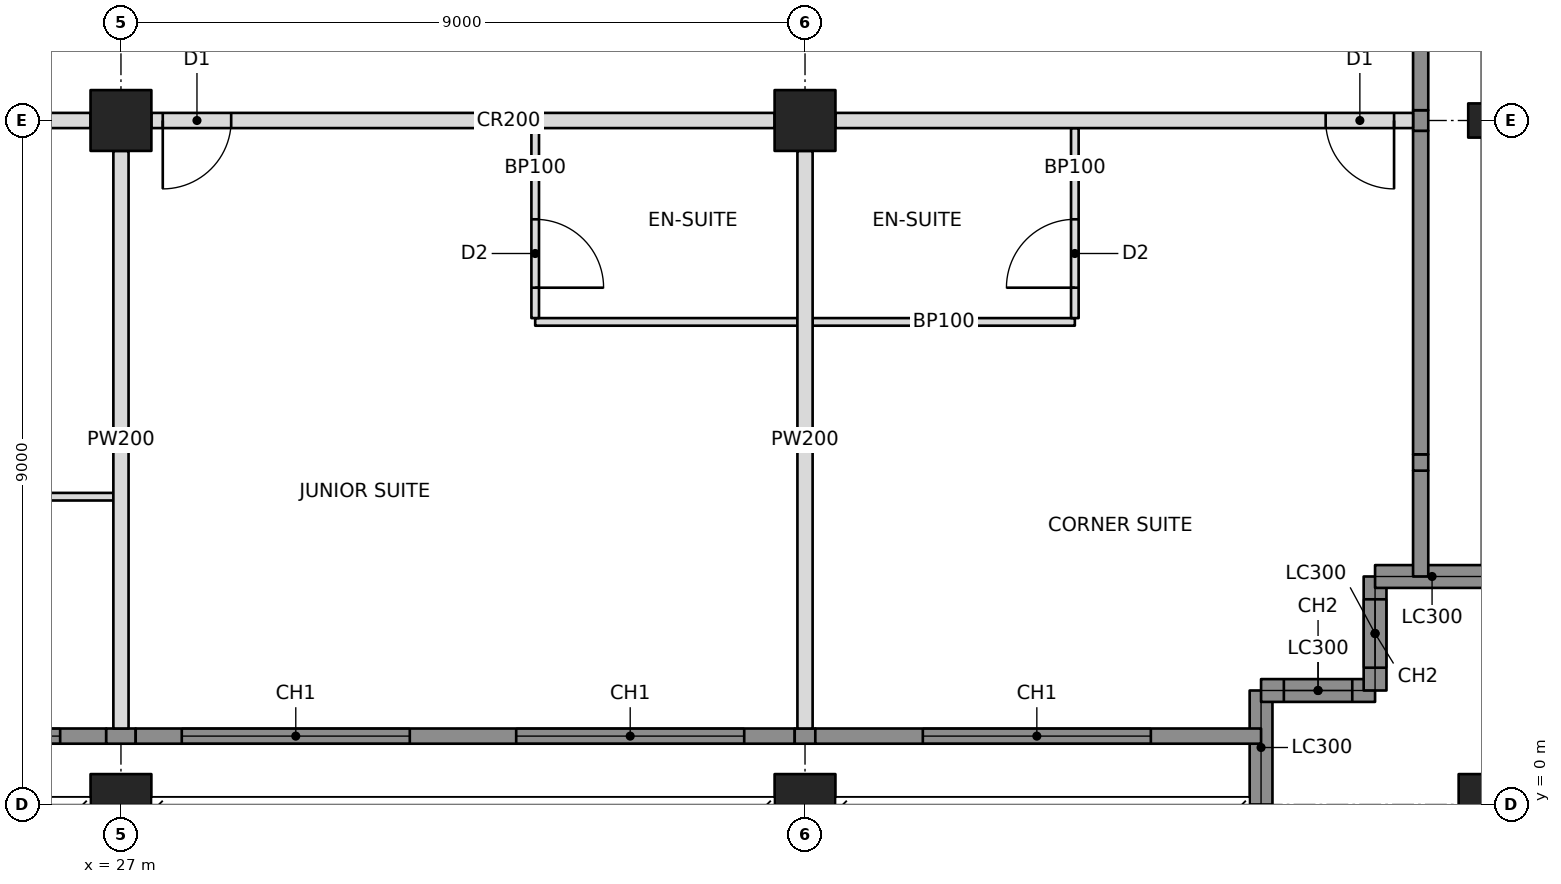
"""IFC4 building model, lengths in metres.
Left out: names, types, materials, properties, quantities, classifications, styles, units other than length and angle.
Written with IfcOpenShell. Run it as: python <this file> out.ifc"""

import sys

from ifc_helpers import new_model, si_unit, direction, frame, frame_2d, origin, origin_2d, place, context, subcontext, project, spatial, rectangle, hollow_rectangle, i_section, extrude, element, fill, save


model = new_model("IFC4")
c1 = context("Model", 3, precision=1e-05, world=origin(), true_north=direction((0.0, 1.0)))
c2 = subcontext(c1, "Body", "Model", "MODEL_VIEW")
j1 = project(units=[si_unit("LENGTHUNIT", "METRE"), si_unit("PLANEANGLEUNIT", "RADIAN")], contexts=[c1])
p1 = place(None, origin())
s1 = spatial("IfcSite", under=j1, at=p1, CompositionType="ELEMENT")
p2 = place(p1, origin())
s2 = spatial("IfcBuilding", under=s1, at=p2, CompositionType="ELEMENT")
p3 = place(p2, frame((0.0, 0.0, 174.0)))
s3 = spatial("IfcBuildingStorey", under=s2, at=p3, CompositionType="ELEMENT", Elevation=174.0)
p4 = place(p3, frame((27.0, 0.0, 0.0), z_axis=(0.0, 0.0, 1.0), x_axis=(1.0, 0.0, 0.0)))
e1 = element("IfcColumn", 1, at=p4, inside=s3, PredefinedType="COLUMN", context=c2, shape_type="SweptSolid", body=[
    extrude(hollow_rectangle(XDim=0.8, YDim=0.8, WallThickness=0.07, at=origin_2d()), origin(), (0.0, 0.0, 1.0), 3.4),
])
p5 = place(p3, frame((27.0, 9.0, 0.0), z_axis=(0.0, 0.0, 1.0), x_axis=(1.0, 0.0, 0.0)))
e2 = element("IfcColumn", 2, at=p5, inside=s3, PredefinedType="COLUMN", context=c2, shape_type="SweptSolid", body=[
    extrude(hollow_rectangle(XDim=0.8, YDim=0.8, WallThickness=0.06, at=origin_2d()), origin(), (0.0, 0.0, 1.0), 3.4),
])
p6 = place(p3, frame((36.0, 0.0, 0.0), z_axis=(0.0, 0.0, 1.0), x_axis=(1.0, 0.0, 0.0)))
e3 = element("IfcColumn", 3, at=p6, inside=s3, PredefinedType="COLUMN", context=c2, shape_type="SweptSolid", body=[
    extrude(hollow_rectangle(XDim=0.8, YDim=0.8, WallThickness=0.07, at=origin_2d()), origin(), (0.0, 0.0, 1.0), 3.4),
])
p7 = place(p3, frame((36.0, 9.0, 0.0), z_axis=(0.0, 0.0, 1.0), x_axis=(0.0, 1.0, 0.0)))
e4 = element("IfcColumn", 4, at=p7, inside=s3, PredefinedType="COLUMN", context=c2, shape_type="SweptSolid", body=[
    extrude(hollow_rectangle(XDim=0.8, YDim=0.8, WallThickness=0.06, at=origin_2d()), origin(), (0.0, 0.0, 1.0), 3.4),
])
p8 = place(p3, frame((45.0, 0.0, 0.0), z_axis=(0.0, 0.0, 1.0), x_axis=(1.0, 0.0, 0.0)))
e5 = element("IfcColumn", 5, at=p8, inside=s3, PredefinedType="COLUMN", context=c2, shape_type="SweptSolid", body=[
    extrude(hollow_rectangle(XDim=0.8, YDim=0.8, WallThickness=0.07, at=origin_2d()), origin(), (0.0, 0.0, 1.0), 3.4),
])
p9 = place(p3, frame((45.0, 9.0, 0.0), z_axis=(0.0, 0.0, 1.0), x_axis=(0.0, 1.0, 0.0)))
e6 = element("IfcColumn", 6, at=p9, inside=s3, PredefinedType="COLUMN", context=c2, shape_type="SweptSolid", body=[
    extrude(i_section(OverallWidth=0.449, OverallDepth=0.549, WebThickness=0.072, FlangeThickness=0.115, at=origin_2d()), origin(), (0.0, 0.0, 1.0), 3.4),
])
p10 = place(p3, frame((42.0, 0.0, 0.0), z_axis=(0.0, 0.0, 1.0), x_axis=(0.0, 1.0, 0.0)))
e7 = element("IfcWall", 7, at=p10, inside=s3, PredefinedType="SOLIDWALL", context=c2, shape_type="SweptSolid", body=[
    extrude(rectangle(XDim=1.5, YDim=0.3, at=frame_2d((0.75, 0.0))), origin(), (0.0, 0.0, 1.0), 2.42),
])
p11 = place(p3, frame((42.0, 1.5, 0.0), z_axis=(0.0, 0.0, 1.0), x_axis=(1.0, 0.0, 0.0)))
e8 = element("IfcWall", 8, at=p11, inside=s3, PredefinedType="SOLIDWALL", context=c2, shape_type="SweptSolid", body=[
    extrude(rectangle(XDim=1.5, YDim=0.3, at=frame_2d((0.75, 0.0))), origin(), (0.0, 0.0, 1.0), 3.2),
])
p12 = place(p11, frame((0.3, 0.0, 0.6)))
e9 = element("IfcOpeningElement", 9, at=p12, cuts=e8, PredefinedType="OPENING", context=c2, shape_type="SweptSolid", body=[
    extrude(rectangle(XDim=0.9, YDim=2.2, at=frame_2d((0.45, 1.1))), frame((0.0, 0.16, 0.0), z_axis=(0.0, -1.0, 0.0), x_axis=(1.0, 0.0, 0.0)), (0.0, 0.0, 1.0), 0.32),
])
p13 = place(p3, frame((43.5, 1.5, 0.0), z_axis=(0.0, 0.0, 1.0), x_axis=(0.0, 1.0, 0.0)))
e10 = element("IfcWall", 10, at=p13, inside=s3, PredefinedType="SOLIDWALL", context=c2, shape_type="SweptSolid", body=[
    extrude(rectangle(XDim=1.5, YDim=0.3, at=frame_2d((0.75, 0.0))), origin(), (0.0, 0.0, 1.0), 3.2),
])
p14 = place(p13, frame((0.3, 0.0, 0.6)))
e11 = element("IfcOpeningElement", 11, at=p14, cuts=e10, PredefinedType="OPENING", context=c2, shape_type="SweptSolid", body=[
    extrude(rectangle(XDim=0.9, YDim=2.2, at=frame_2d((0.45, 1.1))), frame((0.0, 0.16, 0.0), z_axis=(0.0, -1.0, 0.0), x_axis=(1.0, 0.0, 0.0)), (0.0, 0.0, 1.0), 0.32),
])
p15 = place(p3, frame((43.5, 3.0, 0.0), z_axis=(0.0, 0.0, 1.0), x_axis=(1.0, 0.0, 0.0)))
e12 = element("IfcWall", 12, at=p15, inside=s3, PredefinedType="SOLIDWALL", context=c2, shape_type="SweptSolid", body=[
    extrude(rectangle(XDim=1.5, YDim=0.3, at=frame_2d((0.75, 0.0))), origin(), (0.0, 0.0, 1.0), 2.42),
])
p16 = place(p3, frame((44.1, 3.0, 0.0), z_axis=(0.0, 0.0, 1.0), x_axis=(0.0, 1.0, 0.0)))
e13 = element("IfcWall", 13, at=p16, inside=s3, PredefinedType="SOLIDWALL", context=c2, shape_type="SweptSolid", body=[
    extrude(rectangle(XDim=1.393, YDim=0.2, at=frame_2d((0.696, 0.0))), origin(), (0.0, 0.0, 1.0), 3.2),
])
p17 = place(p3, frame((18.4, 9.0, 0.0), z_axis=(0.0, 0.0, 1.0), x_axis=(1.0, 0.0, 0.0)))
e14 = element("IfcWall", 14, at=p17, inside=s3, PredefinedType="PARTITIONING", context=c2, shape_type="SweptSolid", body=[
    extrude(rectangle(XDim=8.2, YDim=0.2, at=frame_2d((4.1, 0.0))), origin(), (0.0, 0.0, 1.0), 2.405),
])
p18 = place(p17, frame((0.15, 0.0, 0.0)))
e15 = element("IfcOpeningElement", 15, at=p18, cuts=e14, PredefinedType="OPENING", context=c2, shape_type="SweptSolid", body=[
    extrude(rectangle(XDim=0.9, YDim=2.1, at=frame_2d((0.45, 1.05))), frame((0.0, 0.11, 0.0), z_axis=(0.0, -1.0, 0.0), x_axis=(1.0, 0.0, 0.0)), (0.0, 0.0, 1.0), 0.22),
])
p19 = place(p3, frame((27.4, 9.0, 0.0), z_axis=(0.0, 0.0, 1.0), x_axis=(1.0, 0.0, 0.0)))
e16 = element("IfcWall", 16, at=p19, inside=s3, PredefinedType="PARTITIONING", context=c2, shape_type="SweptSolid", body=[
    extrude(rectangle(XDim=8.2, YDim=0.2, at=frame_2d((4.1, 0.0))), origin(), (0.0, 0.0, 1.0), 2.405),
])
p20 = place(p19, frame((0.15, 0.0, 0.0)))
e17 = element("IfcOpeningElement", 17, at=p20, cuts=e16, PredefinedType="OPENING", context=c2, shape_type="SweptSolid", body=[
    extrude(rectangle(XDim=0.9, YDim=2.1, at=frame_2d((0.45, 1.05))), frame((0.0, 0.11, 0.0), z_axis=(0.0, -1.0, 0.0), x_axis=(1.0, 0.0, 0.0)), (0.0, 0.0, 1.0), 0.22),
])
p21 = place(p3, frame((36.4, 9.0, 0.0), z_axis=(0.0, 0.0, 1.0), x_axis=(1.0, 0.0, 0.0)))
e18 = element("IfcWall", 18, at=p21, inside=s3, PredefinedType="PARTITIONING", context=c2, shape_type="SweptSolid", body=[
    extrude(rectangle(XDim=7.6, YDim=0.2, at=frame_2d((3.8, 0.0))), origin(), (0.0, 0.0, 1.0), 2.438),
])
p22 = place(p21, frame((6.45, 0.0, 0.0)))
e19 = element("IfcOpeningElement", 19, at=p22, cuts=e18, PredefinedType="OPENING", context=c2, shape_type="SweptSolid", body=[
    extrude(rectangle(XDim=0.9, YDim=2.1, at=frame_2d((0.45, 1.05))), frame((0.0, 0.11, 0.0), z_axis=(0.0, -1.0, 0.0), x_axis=(1.0, 0.0, 0.0)), (0.0, 0.0, 1.0), 0.22),
])
p23 = place(p3, frame((27.0, 8.6, 0.0), z_axis=(0.0, 0.0, 1.0), x_axis=(0.0, -1.0, 0.0)))
e20 = element("IfcWall", 20, at=p23, inside=s3, PredefinedType="PARTITIONING", context=c2, shape_type="SweptSolid", body=[
    extrude(rectangle(XDim=7.6, YDim=0.2, at=frame_2d((3.8, 0.0))), origin(), (0.0, 0.0, 1.0), 2.405),
])
p24 = place(p3, frame((36.0, 8.6, 0.0), z_axis=(0.0, 0.0, 1.0), x_axis=(0.0, -1.0, 0.0)))
e21 = element("IfcWall", 21, at=p24, inside=s3, PredefinedType="PARTITIONING", context=c2, shape_type="SweptSolid", body=[
    extrude(rectangle(XDim=7.6, YDim=0.2, at=frame_2d((3.8, 0.0))), origin(), (0.0, 0.0, 1.0), 2.438),
])
p25 = place(p3, frame((22.5, 4.05, 0.0), z_axis=(0.0, 0.0, 1.0), x_axis=(1.0, 0.0, 0.0)))
e22 = element("IfcWall", 22, at=p25, inside=s3, PredefinedType="PARTITIONING", context=c2, shape_type="SweptSolid", body=[
    extrude(rectangle(XDim=4.4, YDim=0.1, at=frame_2d((2.2, 0.0))), origin(), (0.0, 0.0, 1.0), 2.404),
])
p26 = place(p25, frame((0.5, 0.0, 0.0)))
e23 = element("IfcOpeningElement", 23, at=p26, cuts=e22, PredefinedType="OPENING", context=c2, shape_type="SweptSolid", body=[
    extrude(rectangle(XDim=0.9, YDim=2.1, at=frame_2d((0.45, 1.05))), frame((0.0, 0.06, 0.0), z_axis=(0.0, -1.0, 0.0), x_axis=(1.0, 0.0, 0.0)), (0.0, 0.0, 1.0), 0.12),
])
p27 = place(p3, frame((32.45, 6.35, 0.0), z_axis=(0.0, 0.0, 1.0), x_axis=(1.0, 0.0, 0.0)))
e24 = element("IfcWall", 24, at=p27, inside=s3, PredefinedType="PARTITIONING", context=c2, shape_type="SweptSolid", body=[
    extrude(rectangle(XDim=3.45, YDim=0.1, at=frame_2d((1.725, 0.0))), origin(), (0.0, 0.0, 1.0), 2.438),
])
p28 = place(p3, frame((32.45, 8.9, 0.0), z_axis=(0.0, 0.0, 1.0), x_axis=(0.0, -1.0, 0.0)))
e25 = element("IfcWall", 25, at=p28, inside=s3, PredefinedType="PARTITIONING", context=c2, shape_type="SweptSolid", body=[
    extrude(rectangle(XDim=2.5, YDim=0.1, at=frame_2d((1.25, 0.0))), origin(), (0.0, 0.0, 1.0), 2.404),
])
p29 = place(p28, frame((1.2, 0.0, 0.0)))
e26 = element("IfcOpeningElement", 26, at=p29, cuts=e25, PredefinedType="OPENING", context=c2, shape_type="SweptSolid", body=[
    extrude(rectangle(XDim=0.9, YDim=2.1, at=frame_2d((0.45, 1.05))), frame((0.0, 0.06, 0.0), z_axis=(0.0, -1.0, 0.0), x_axis=(1.0, 0.0, 0.0)), (0.0, 0.0, 1.0), 0.12),
])
p30 = place(p3, frame((36.1, 6.35, 0.0), z_axis=(0.0, 0.0, 1.0), x_axis=(1.0, 0.0, 0.0)))
e27 = element("IfcWall", 27, at=p30, inside=s3, PredefinedType="PARTITIONING", context=c2, shape_type="SweptSolid", body=[
    extrude(rectangle(XDim=3.45, YDim=0.1, at=frame_2d((1.725, 0.0))), origin(), (0.0, 0.0, 1.0), 2.438),
])
p31 = place(p3, frame((39.55, 8.9, 0.0), z_axis=(0.0, 0.0, 1.0), x_axis=(0.0, -1.0, 0.0)))
e28 = element("IfcWall", 28, at=p31, inside=s3, PredefinedType="PARTITIONING", context=c2, shape_type="SweptSolid", body=[
    extrude(rectangle(XDim=2.5, YDim=0.1, at=frame_2d((1.25, 0.0))), origin(), (0.0, 0.0, 1.0), 2.438),
])
p32 = place(p31, frame((1.2, 0.0, 0.0)))
e29 = element("IfcOpeningElement", 29, at=p32, cuts=e28, PredefinedType="OPENING", context=c2, shape_type="SweptSolid", body=[
    extrude(rectangle(XDim=0.9, YDim=2.1, at=frame_2d((0.45, 1.05))), frame((0.0, 0.06, 0.0), z_axis=(0.0, -1.0, 0.0), x_axis=(1.0, 0.0, 0.0)), (0.0, 0.0, 1.0), 0.12),
])
p33 = place(p3, frame((18.194, 0.9, 0.0), z_axis=(0.0, 0.0, 1.0), x_axis=(1.0, 0.0, 0.0)))
e30 = element("IfcWall", 30, at=p33, inside=s3, PredefinedType="SOLIDWALL", context=c2, shape_type="SweptSolid", body=[
    extrude(rectangle(XDim=8.612, YDim=0.2, at=frame_2d((4.306, 0.0))), origin(), (0.0, 0.0, 1.0), 3.2),
])
p34 = place(p33, frame((0.606, 0.0, 0.6)))
e31 = element("IfcOpeningElement", 31, at=p34, cuts=e30, PredefinedType="OPENING", context=c2, shape_type="SweptSolid", body=[
    extrude(rectangle(XDim=3.0, YDim=2.2, at=frame_2d((1.5, 1.1))), frame((0.0, 0.11, 0.0), z_axis=(0.0, -1.0, 0.0), x_axis=(1.0, 0.0, 0.0)), (0.0, 0.0, 1.0), 0.22),
])
p35 = place(p33, frame((5.006, 0.0, 0.6)))
e32 = element("IfcOpeningElement", 32, at=p35, cuts=e30, PredefinedType="OPENING", context=c2, shape_type="SweptSolid", body=[
    extrude(rectangle(XDim=3.0, YDim=2.2, at=frame_2d((1.5, 1.1))), frame((0.0, 0.11, 0.0), z_axis=(0.0, -1.0, 0.0), x_axis=(1.0, 0.0, 0.0)), (0.0, 0.0, 1.0), 0.22),
])
p36 = place(p3, frame((26.806, 0.9, 0.0), z_axis=(0.0, 0.0, 1.0), x_axis=(1.0, 0.0, 0.0)))
e33 = element("IfcWall", 33, at=p36, inside=s3, PredefinedType="SOLIDWALL", context=c2, shape_type="SweptSolid", body=[
    extrude(rectangle(XDim=0.388, YDim=0.2, at=frame_2d((0.194, 0.0))), origin(), (0.0, 0.0, 1.0), 2.404),
])
p37 = place(p3, frame((27.194, 0.9, 0.0), z_axis=(0.0, 0.0, 1.0), x_axis=(1.0, 0.0, 0.0)))
e34 = element("IfcWall", 34, at=p37, inside=s3, PredefinedType="SOLIDWALL", context=c2, shape_type="SweptSolid", body=[
    extrude(rectangle(XDim=8.671, YDim=0.2, at=frame_2d((4.335, 0.0))), origin(), (0.0, 0.0, 1.0), 3.2),
])
p38 = place(p37, frame((0.606, 0.0, 0.6)))
e35 = element("IfcOpeningElement", 35, at=p38, cuts=e34, PredefinedType="OPENING", context=c2, shape_type="SweptSolid", body=[
    extrude(rectangle(XDim=3.0, YDim=2.2, at=frame_2d((1.5, 1.1))), frame((0.0, 0.11, 0.0), z_axis=(0.0, -1.0, 0.0), x_axis=(1.0, 0.0, 0.0)), (0.0, 0.0, 1.0), 0.22),
])
p39 = place(p37, frame((5.006, 0.0, 0.6)))
e36 = element("IfcOpeningElement", 36, at=p39, cuts=e34, PredefinedType="OPENING", context=c2, shape_type="SweptSolid", body=[
    extrude(rectangle(XDim=3.0, YDim=2.2, at=frame_2d((1.5, 1.1))), frame((0.0, 0.11, 0.0), z_axis=(0.0, -1.0, 0.0), x_axis=(1.0, 0.0, 0.0)), (0.0, 0.0, 1.0), 0.22),
])
p40 = place(p3, frame((35.865, 0.9, 0.0), z_axis=(0.0, 0.0, 1.0), x_axis=(1.0, 0.0, 0.0)))
e37 = element("IfcWall", 37, at=p40, inside=s3, PredefinedType="SOLIDWALL", context=c2, shape_type="SweptSolid", body=[
    extrude(rectangle(XDim=0.271, YDim=0.2, at=frame_2d((0.135, 0.0))), origin(), (0.0, 0.0, 1.0), 2.438),
])
p41 = place(p3, frame((36.135, 0.9, 0.0), z_axis=(0.0, 0.0, 1.0), x_axis=(1.0, 0.0, 0.0)))
e38 = element("IfcWall", 38, at=p41, inside=s3, PredefinedType="SOLIDWALL", context=c2, shape_type="SweptSolid", body=[
    extrude(rectangle(XDim=5.865, YDim=0.2, at=frame_2d((2.932, 0.0))), origin(), (0.0, 0.0, 1.0), 3.2),
])
p42 = place(p41, frame((1.415, 0.0, 0.6)))
e39 = element("IfcOpeningElement", 39, at=p42, cuts=e38, PredefinedType="OPENING", context=c2, shape_type="SweptSolid", body=[
    extrude(rectangle(XDim=3.0, YDim=2.2, at=frame_2d((1.5, 1.1))), frame((0.0, 0.11, 0.0), z_axis=(0.0, -1.0, 0.0), x_axis=(1.0, 0.0, 0.0)), (0.0, 0.0, 1.0), 0.22),
])
p43 = place(p3, frame((44.1, 4.393, 0.0), z_axis=(0.0, 0.0, 1.0), x_axis=(0.0, 1.0, 0.0)))
e40 = element("IfcWall", 40, at=p43, inside=s3, PredefinedType="SOLIDWALL", context=c2, shape_type="SweptSolid", body=[
    extrude(rectangle(XDim=0.215, YDim=0.2, at=frame_2d((0.107, 0.0))), origin(), (0.0, 0.0, 1.0), 2.661),
])
p44 = place(p3, frame((44.1, 4.607, 0.0), z_axis=(0.0, 0.0, 1.0), x_axis=(0.0, 1.0, 0.0)))
e41 = element("IfcWall", 41, at=p44, inside=s3, PredefinedType="SOLIDWALL", context=c2, shape_type="SweptSolid", body=[
    extrude(rectangle(XDim=4.257, YDim=0.2, at=frame_2d((2.129, 0.0))), origin(), (0.0, 0.0, 1.0), 3.2),
])
p45 = place(p3, frame((44.1, 8.865, 0.0), z_axis=(0.0, 0.0, 1.0), x_axis=(0.0, 1.0, 0.0)))
e42 = element("IfcWall", 42, at=p45, inside=s3, PredefinedType="SOLIDWALL", context=c2, shape_type="SweptSolid", body=[
    extrude(rectangle(XDim=0.271, YDim=0.2, at=frame_2d((0.135, 0.0))), origin(), (0.0, 0.0, 1.0), 2.438),
])
p46 = place(p3, frame((44.1, 9.135, 0.0), z_axis=(0.0, 0.0, 1.0), x_axis=(0.0, 1.0, 0.0)))
e43 = element("IfcWall", 43, at=p46, inside=s3, PredefinedType="SOLIDWALL", context=c2, shape_type="SweptSolid", body=[
    extrude(rectangle(XDim=8.671, YDim=0.2, at=frame_2d((4.335, 0.0))), origin(), (0.0, 0.0, 1.0), 3.2),
])
p47 = place(p46, frame((2.015, 0.0, 0.6)))
e44 = element("IfcOpeningElement", 44, at=p47, cuts=e43, PredefinedType="OPENING", context=c2, shape_type="SweptSolid", body=[
    extrude(rectangle(XDim=3.0, YDim=2.2, at=frame_2d((1.5, 1.1))), frame((0.0, 0.11, 0.0), z_axis=(0.0, -1.0, 0.0), x_axis=(1.0, 0.0, 0.0)), (0.0, 0.0, 1.0), 0.22),
])
p48 = place(p46, frame((5.515, 0.0, 0.6)))
e45 = element("IfcOpeningElement", 45, at=p48, cuts=e43, PredefinedType="OPENING", context=c2, shape_type="SweptSolid", body=[
    extrude(rectangle(XDim=3.0, YDim=2.2, at=frame_2d((1.5, 1.1))), frame((0.0, 0.11, 0.0), z_axis=(0.0, -1.0, 0.0), x_axis=(1.0, 0.0, 0.0)), (0.0, 0.0, 1.0), 0.22),
])
p49 = place(p12, origin())
e46 = element("IfcWindow", 46, at=p49, inside=s3, PartitioningType="SINGLE_PANEL", PredefinedType="WINDOW", context=c2, shape_type="SweptSolid", body=[
    extrude(rectangle(XDim=0.9, YDim=2.2, at=frame_2d((0.45, 1.1))), frame((0.0, 0.03, 0.0), z_axis=(0.0, -1.0, 0.0), x_axis=(1.0, 0.0, 0.0)), (0.0, 0.0, 1.0), 0.06),
])
fill(e9, e46)
p50 = place(p14, origin())
e47 = element("IfcWindow", 47, at=p50, inside=s3, PartitioningType="SINGLE_PANEL", PredefinedType="WINDOW", context=c2, shape_type="SweptSolid", body=[
    extrude(rectangle(XDim=0.9, YDim=2.2, at=frame_2d((0.45, 1.1))), frame((0.0, 0.03, 0.0), z_axis=(0.0, -1.0, 0.0), x_axis=(1.0, 0.0, 0.0)), (0.0, 0.0, 1.0), 0.06),
])
fill(e11, e47)
p51 = place(p35, origin())
e48 = element("IfcWindow", 48, at=p51, inside=s3, PartitioningType="TRIPLE_PANEL_VERTICAL", PredefinedType="WINDOW", context=c2, shape_type="SweptSolid", body=[
    extrude(rectangle(XDim=3.0, YDim=2.2, at=frame_2d((1.5, 1.1))), frame((0.0, 0.03, 0.0), z_axis=(0.0, -1.0, 0.0), x_axis=(1.0, 0.0, 0.0)), (0.0, 0.0, 1.0), 0.06),
])
fill(e32, e48)
p52 = place(p38, origin())
e49 = element("IfcWindow", 49, at=p52, inside=s3, PartitioningType="TRIPLE_PANEL_VERTICAL", PredefinedType="WINDOW", context=c2, shape_type="SweptSolid", body=[
    extrude(rectangle(XDim=3.0, YDim=2.2, at=frame_2d((1.5, 1.1))), frame((0.0, 0.03, 0.0), z_axis=(0.0, -1.0, 0.0), x_axis=(1.0, 0.0, 0.0)), (0.0, 0.0, 1.0), 0.06),
])
fill(e35, e49)
p53 = place(p39, origin())
e50 = element("IfcWindow", 50, at=p53, inside=s3, PartitioningType="TRIPLE_PANEL_VERTICAL", PredefinedType="WINDOW", context=c2, shape_type="SweptSolid", body=[
    extrude(rectangle(XDim=3.0, YDim=2.2, at=frame_2d((1.5, 1.1))), frame((0.0, 0.03, 0.0), z_axis=(0.0, -1.0, 0.0), x_axis=(1.0, 0.0, 0.0)), (0.0, 0.0, 1.0), 0.06),
])
fill(e36, e50)
p54 = place(p42, origin())
e51 = element("IfcWindow", 51, at=p54, inside=s3, PartitioningType="TRIPLE_PANEL_VERTICAL", PredefinedType="WINDOW", context=c2, shape_type="SweptSolid", body=[
    extrude(rectangle(XDim=3.0, YDim=2.2, at=frame_2d((1.5, 1.1))), frame((0.0, 0.03, 0.0), z_axis=(0.0, -1.0, 0.0), x_axis=(1.0, 0.0, 0.0)), (0.0, 0.0, 1.0), 0.06),
])
fill(e39, e51)
p55 = place(p29, origin())
e52 = element("IfcDoor", 52, at=p55, inside=s3, OperationType="SINGLE_SWING_RIGHT", PredefinedType="DOOR", context=c2, shape_type="SweptSolid", body=[
    extrude(rectangle(XDim=0.9, YDim=2.1, at=frame_2d((0.45, 1.05))), frame((0.0, 0.025, 0.0), z_axis=(0.0, -1.0, 0.0), x_axis=(1.0, 0.0, 0.0)), (0.0, 0.0, 1.0), 0.05),
])
fill(e26, e52)
p56 = place(p20, frame((0.9, 0.0, 0.0), z_axis=(0.0, 0.0, 1.0), x_axis=(-1.0, 0.0, 0.0)))
e53 = element("IfcDoor", 53, at=p56, inside=s3, OperationType="SINGLE_SWING_RIGHT", PredefinedType="DOOR", context=c2, shape_type="SweptSolid", body=[
    extrude(rectangle(XDim=0.9, YDim=2.1, at=frame_2d((0.45, 1.05))), frame((0.0, 0.025, 0.0), z_axis=(0.0, -1.0, 0.0), x_axis=(1.0, 0.0, 0.0)), (0.0, 0.0, 1.0), 0.05),
])
fill(e17, e53)
p57 = place(p32, frame((0.9, 0.0, 0.0), z_axis=(0.0, 0.0, 1.0), x_axis=(-1.0, 0.0, 0.0)))
e54 = element("IfcDoor", 54, at=p57, inside=s3, OperationType="SINGLE_SWING_LEFT", PredefinedType="DOOR", context=c2, shape_type="SweptSolid", body=[
    extrude(rectangle(XDim=0.9, YDim=2.1, at=frame_2d((0.45, 1.05))), frame((0.0, 0.025, 0.0), z_axis=(0.0, -1.0, 0.0), x_axis=(1.0, 0.0, 0.0)), (0.0, 0.0, 1.0), 0.05),
])
fill(e29, e54)
p58 = place(p22, frame((0.9, 0.0, 0.0), z_axis=(0.0, 0.0, 1.0), x_axis=(-1.0, 0.0, 0.0)))
e55 = element("IfcDoor", 55, at=p58, inside=s3, OperationType="SINGLE_SWING_LEFT", PredefinedType="DOOR", context=c2, shape_type="SweptSolid", body=[
    extrude(rectangle(XDim=0.9, YDim=2.1, at=frame_2d((0.45, 1.05))), frame((0.0, 0.025, 0.0), z_axis=(0.0, -1.0, 0.0), x_axis=(1.0, 0.0, 0.0)), (0.0, 0.0, 1.0), 0.05),
])
fill(e19, e55)
save(model, sys.argv[1])
